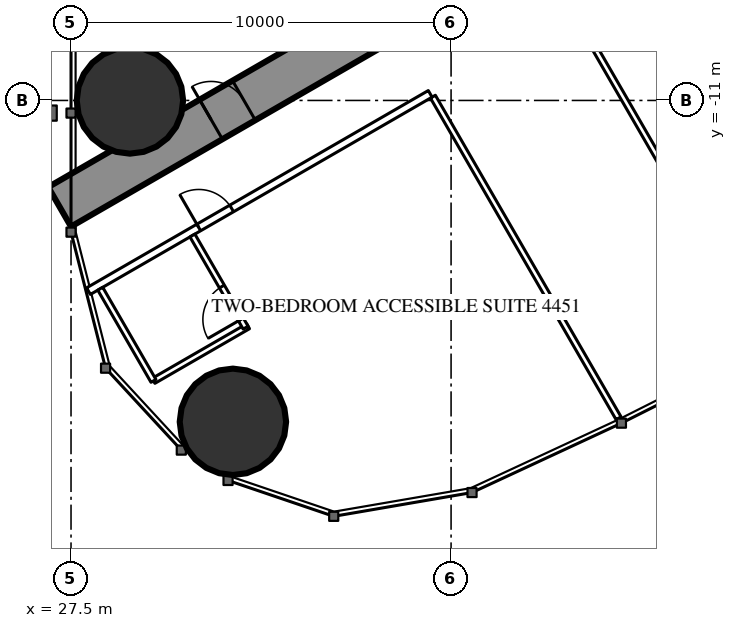
"""IFC4 building model, lengths in metres.
Left out: names, types, materials, properties, quantities, classifications, styles, units other than length and angle.
Written with IfcOpenShell. Run it as: python <this file> out.ifc"""

import sys

from ifc_helpers import new_model, si_unit, direction, frame, frame_2d, origin, origin_2d, place, context, subcontext, project, spatial, rectangle, circle, extrude, element, fill, save


model = new_model("IFC4")
c1 = context("Model", 3, precision=1e-05, world=origin(), true_north=direction((0.0, 1.0)))
c2 = subcontext(c1, "Body", "Model", "MODEL_VIEW")
j1 = project(units=[si_unit("LENGTHUNIT", "METRE"), si_unit("PLANEANGLEUNIT", "RADIAN")], contexts=[c1])
p1 = place(None, origin())
s1 = spatial("IfcSite", under=j1, at=p1, CompositionType="ELEMENT")
p2 = place(p1, origin())
s2 = spatial("IfcBuilding", under=s1, at=p2, CompositionType="ELEMENT")
p3 = place(p2, frame((0.0, 0.0, 166.8)))
s3 = spatial("IfcBuildingStorey", under=s2, at=p3, CompositionType="ELEMENT", Elevation=166.8)
for number, where, z_axis, x_axis in (
    (1, (31.76, -19.456, 0.0), (0.0, 0.0, 1.0), (1.0, 0.0, 0.0)),
    (2, (29.05, -11.0, 0.0), (0.0, 0.0, 1.0), (1.0, 0.0, 0.0)),
):
    element("IfcColumn", number, at=place(p3, frame(where, z_axis=z_axis, x_axis=x_axis)), inside=s3, PredefinedType="COLUMN", context=c2, shape_type="SweptSolid", body=[
        extrude(circle(Radius=1.4, at=origin_2d()), origin(), (0.0, 0.0, 1.0), 3.5),
    ])
p4 = place(p3, frame((27.2, -13.8, 0.0), z_axis=(0.0, 0.0, 1.0), x_axis=(0.866027159892, 0.499996958321, 0.0)))
e3 = element("IfcWall", 3, at=p4, inside=s3, PredefinedType="SHEAR", context=c2, shape_type="SweptSolid", body=[
    extrude(rectangle(XDim=27.947, YDim=1.2, at=frame_2d((13.973, 0.0))), origin(), (0.0, 0.0, 1.0), 3.5),
])
p5 = place(p4, frame((4.6, 0.0, 0.0)))
e4 = element("IfcOpeningElement", 4, at=p5, cuts=e3, PredefinedType="OPENING", context=c2, shape_type="SweptSolid", body=[
    extrude(rectangle(XDim=1.0, YDim=2.2, at=frame_2d((0.5, 1.1))), frame((0.0, 0.61, 0.0), z_axis=(0.0, -1.0, 0.0), x_axis=(1.0, 0.0, 0.0)), (0.0, 0.0, 1.0), 1.22),
])
p6 = place(p4, frame((13.395, 0.0, 0.0)))
e5 = element("IfcOpeningElement", 5, at=p6, cuts=e3, PredefinedType="OPENING", context=c2, shape_type="SweptSolid", body=[
    extrude(rectangle(XDim=1.8, YDim=2.2, at=frame_2d((0.9, 1.1))), frame((0.0, 0.61, 0.0), z_axis=(0.0, -1.0, 0.0), x_axis=(1.0, 0.0, 0.0)), (0.0, 0.0, 1.0), 1.22),
])
p7 = place(p3, frame((37.022, -10.9, 0.0), z_axis=(0.0, 0.0, 1.0), x_axis=(0.499998620953, -0.866026199976, 0.0)))
e6 = element("IfcWall", 6, at=p7, inside=s3, PredefinedType="PARTITIONING", context=c2, shape_type="SweptSolid", body=[
    extrude(rectangle(XDim=9.77, YDim=0.15, at=frame_2d((4.885, 0.0))), origin(), (0.0, 0.0, 1.0), 3.25),
])
p8 = place(p3, frame((40.769, -8.737, 0.0), z_axis=(0.0, 0.0, 1.0), x_axis=(0.500013115284, -0.866017831539, 0.0)))
e7 = element("IfcWall", 7, at=p8, inside=s3, PredefinedType="PARTITIONING", context=c2, shape_type="SweptSolid", body=[
    extrude(rectangle(XDim=7.198, YDim=0.15, at=frame_2d((3.599, 0.0))), origin(), (0.0, 0.0, 1.0), 2.3),
])
p9 = place(p3, frame((27.959, -16.017, 0.0), z_axis=(0.0, 0.0, 1.0), x_axis=(0.866026201739, 0.499998617899, 0.0)))
e8 = element("IfcWall", 8, at=p9, inside=s3, PredefinedType="PARTITIONING", context=c2, shape_type="SweptSolid", body=[
    extrude(rectangle(XDim=10.382, YDim=0.2, at=frame_2d((5.191, 0.0))), origin(), (0.0, 0.0, 1.0), 3.25),
])
p10 = place(p9, frame((3.35, 0.0, 0.0)))
e9 = element("IfcOpeningElement", 9, at=p10, cuts=e8, PredefinedType="OPENING", context=c2, shape_type="SweptSolid", body=[
    extrude(rectangle(XDim=1.0, YDim=2.2, at=frame_2d((0.5, 1.1))), frame((0.0, 0.11, 0.0), z_axis=(0.0, -1.0, 0.0), x_axis=(1.0, 0.0, 0.0)), (0.0, 0.0, 1.0), 0.22),
])
p11 = place(p3, frame((29.669, -18.379, 0.0), z_axis=(0.0, 0.0, 1.0), x_axis=(0.866039941686, 0.499974818771, 0.0)))
e10 = element("IfcWall", 10, at=p11, inside=s3, PredefinedType="PARTITIONING", context=c2, shape_type="SweptSolid", body=[
    extrude(rectangle(XDim=2.875, YDim=0.15, at=frame_2d((1.438, 0.0))), origin(), (0.0, 0.0, 1.0), 3.25),
])
p12 = place(p3, frame((30.694, -14.554, 0.0), z_axis=(0.0, 0.0, 1.0), x_axis=(0.500049511043, -0.865996816683, 0.0)))
e11 = element("IfcWall", 11, at=p12, inside=s3, PredefinedType="PARTITIONING", context=c2, shape_type="SweptSolid", body=[
    extrude(rectangle(XDim=2.8, YDim=0.15, at=frame_2d((1.4, 0.0))), origin(), (0.0, 0.0, 1.0), 2.3),
])
p13 = place(p12, frame((1.55, 0.0, 0.0)))
e12 = element("IfcOpeningElement", 12, at=p13, cuts=e11, PredefinedType="OPENING", context=c2, shape_type="SweptSolid", body=[
    extrude(rectangle(XDim=1.0, YDim=2.2, at=frame_2d((0.5, 1.1))), frame((0.0, 0.085, 0.0), z_axis=(0.0, -1.0, 0.0), x_axis=(1.0, 0.0, 0.0)), (0.0, 0.0, 1.0), 0.17),
])
p14 = place(p3, frame((28.269, -15.954, 0.0), z_axis=(0.0, 0.0, 1.0), x_axis=(0.49998411664, -0.866034573852, 0.0)))
e13 = element("IfcWall", 13, at=p14, inside=s3, PredefinedType="PARTITIONING", context=c2, shape_type="SweptSolid", body=[
    extrude(rectangle(XDim=2.8, YDim=0.15, at=frame_2d((1.4, 0.0))), origin(), (0.0, 0.0, 1.0), 3.25),
])
p15 = place(p13, origin())
e14 = element("IfcDoor", 14, at=p15, inside=s3, OperationType="SINGLE_SWING_RIGHT", PredefinedType="DOOR", context=c2, shape_type="SweptSolid", body=[
    extrude(rectangle(XDim=1.0, YDim=2.2, at=frame_2d((0.5, 1.1))), frame((0.0, 0.025, 0.0), z_axis=(0.0, -1.0, 0.0), x_axis=(1.0, 0.0, 0.0)), (0.0, 0.0, 1.0), 0.05),
])
fill(e12, e14)
p16 = place(p10, origin())
e15 = element("IfcDoor", 15, at=p16, inside=s3, OperationType="SINGLE_SWING_LEFT", PredefinedType="DOOR", context=c2, shape_type="SweptSolid", body=[
    extrude(rectangle(XDim=1.0, YDim=2.2, at=frame_2d((0.5, 1.1))), frame((0.0, 0.025, 0.0), z_axis=(0.0, -1.0, 0.0), x_axis=(1.0, 0.0, 0.0)), (0.0, 0.0, 1.0), 0.05),
])
fill(e9, e15)
p17 = place(p5, origin())
e16 = element("IfcDoor", 16, at=p17, inside=s3, OperationType="SINGLE_SWING_LEFT", PredefinedType="DOOR", context=c2, shape_type="SweptSolid", body=[
    extrude(rectangle(XDim=1.0, YDim=2.2, at=frame_2d((0.5, 1.1))), frame((0.0, 0.025, 0.0), z_axis=(0.0, -1.0, 0.0), x_axis=(1.0, 0.0, 0.0)), (0.0, 0.0, 1.0), 0.05),
])
fill(e4, e16)
save(model, sys.argv[1])
